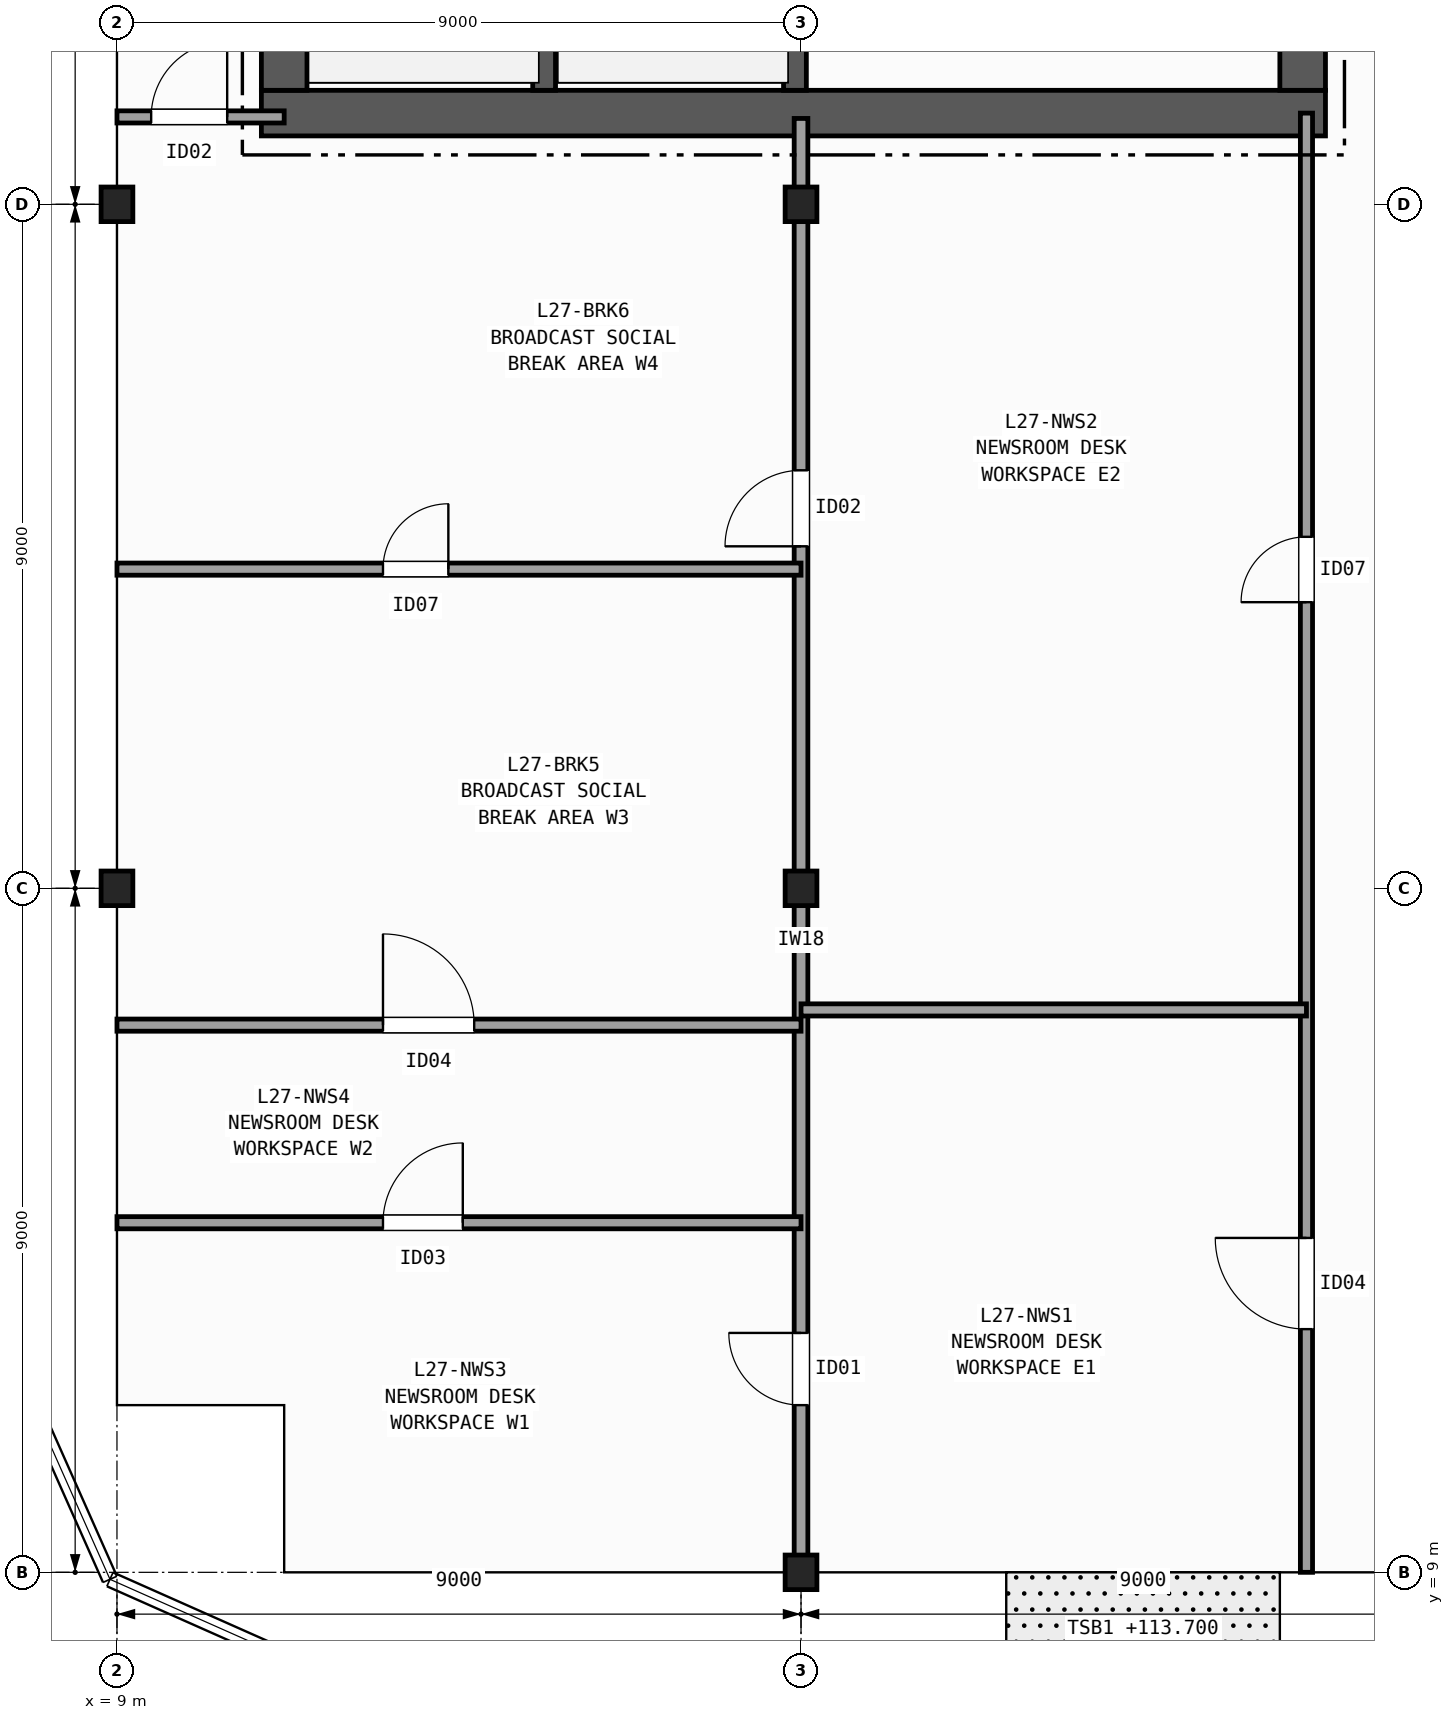
"""IFC4 building model, lengths in metres.
Left out: names, types, materials, properties, quantities, classifications, styles, units other than length and angle.
Written with IfcOpenShell. Run it as: python <this file> out.ifc"""

import sys

from ifc_helpers import new_model, si_unit, direction, frame, frame_2d, origin, origin_2d, place, context, subcontext, project, spatial, rectangle, i_section, extrude, element, fill, save


model = new_model("IFC4")
c1 = context("Model", 3, precision=1e-05, world=origin(), true_north=direction((0.0, 1.0)))
c2 = subcontext(c1, "Body", "Model", "MODEL_VIEW")
j1 = project(units=[si_unit("LENGTHUNIT", "METRE"), si_unit("PLANEANGLEUNIT", "RADIAN")], contexts=[c1])
p1 = place(None, origin())
s1 = spatial("IfcSite", under=j1, at=p1, CompositionType="ELEMENT")
p2 = place(p1, origin())
s2 = spatial("IfcBuilding", under=s1, at=p2, CompositionType="ELEMENT")
p3 = place(p2, frame((0.0, 0.0, 113.7)))
s3 = spatial("IfcBuildingStorey", under=s2, at=p3, CompositionType="ELEMENT", Elevation=113.7)
for number, where, z_axis, x_axis in (
    (1, (9.0, 18.0, 0.0), (0.0, 0.0, 1.0), (1.0, 0.0, 0.0)),
    (2, (9.0, 27.0, 0.0), (0.0, 0.0, 1.0), (1.0, 0.0, 0.0)),
    (3, (18.0, 9.0, 0.0), (0.0, 0.0, 1.0), (1.0, 0.0, 0.0)),
    (4, (18.0, 18.0, 0.0), (0.0, 0.0, 1.0), (1.0, 0.0, 0.0)),
    (5, (18.0, 27.0, 0.0), (0.0, 0.0, 1.0), (1.0, 0.0, 0.0)),
):
    element("IfcColumn", number, at=place(p3, frame(where, z_axis=z_axis, x_axis=x_axis)), inside=s3, PredefinedType="COLUMN", context=c2, shape_type="SweptSolid", body=[
        extrude(i_section(OverallWidth=0.418, OverallDepth=0.455, WebThickness=0.042, FlangeThickness=0.068, FilletRadius=0.015, at=origin_2d()), origin(), (0.0, 0.0, 1.0), 3.7),
    ])
p4 = place(p3, frame((10.9, 28.2, 0.0), z_axis=(0.0, 0.0, 1.0), x_axis=(1.0, 0.0, 0.0)))
e6 = element("IfcWall", 6, at=p4, inside=s3, PredefinedType="SHEAR", context=c2, shape_type="SweptSolid", body=[
    extrude(rectangle(XDim=14.0, YDim=0.6, at=frame_2d((7.0, 0.0))), origin(), (0.0, 0.0, 1.0), 3.42),
])
p5 = place(p3, frame((11.2, 42.1, 0.0), z_axis=(0.0, 0.0, 1.0), x_axis=(0.0, -1.0, 0.0)))
e7 = element("IfcWall", 7, at=p5, inside=s3, PredefinedType="SHEAR", context=c2, shape_type="SweptSolid", body=[
    extrude(rectangle(XDim=13.6, YDim=0.6, at=frame_2d((6.8, 0.0))), origin(), (0.0, 0.0, 1.0), 3.42),
])
p6 = place(p3, frame((24.6, 28.5, 0.0), z_axis=(0.0, 0.0, 1.0), x_axis=(0.0, 1.0, 0.0)))
e8 = element("IfcWall", 8, at=p6, inside=s3, PredefinedType="SHEAR", context=c2, shape_type="SweptSolid", body=[
    extrude(rectangle(XDim=13.6, YDim=0.6, at=frame_2d((6.8, 0.0))), origin(), (0.0, 0.0, 1.0), 3.42),
])
p7 = place(p6, frame((3.3, 0.0, 0.0)))
e9 = element("IfcOpeningElement", 9, at=p7, cuts=e8, PredefinedType="OPENING", context=c2, shape_type="SweptSolid", body=[
    extrude(rectangle(XDim=1.5, YDim=2.2, at=frame_2d((0.75, 1.1))), frame((0.0, 0.31, 0.0), z_axis=(0.0, -1.0, 0.0), x_axis=(1.0, 0.0, 0.0)), (0.0, 0.0, 1.0), 0.62),
])
p8 = place(p6, frame((9.9, 0.0, 0.0)))
e10 = element("IfcOpeningElement", 10, at=p8, cuts=e8, PredefinedType="OPENING", context=c2, shape_type="SweptSolid", body=[
    extrude(rectangle(XDim=0.9, YDim=2.1, at=frame_2d((0.45, 1.05))), frame((0.0, 0.31, 0.0), z_axis=(0.0, -1.0, 0.0), x_axis=(1.0, 0.0, 0.0)), (0.0, 0.0, 1.0), 0.62),
])
p9 = place(p6, frame((12.0, 0.0, 0.0)))
e11 = element("IfcOpeningElement", 11, at=p9, cuts=e8, PredefinedType="OPENING", context=c2, shape_type="SweptSolid", body=[
    extrude(rectangle(XDim=0.9, YDim=2.1, at=frame_2d((0.45, 1.05))), frame((0.0, 0.31, 0.0), z_axis=(0.0, -1.0, 0.0), x_axis=(1.0, 0.0, 0.0)), (0.0, 0.0, 1.0), 0.62),
])
p10 = place(p3, frame((14.62, 28.5, 0.0), z_axis=(0.0, 0.0, 1.0), x_axis=(0.0, 1.0, 0.0)))
e12 = element("IfcWall", 12, at=p10, inside=s3, PredefinedType="SHEAR", context=c2, shape_type="SweptSolid", body=[
    extrude(rectangle(XDim=8.95, YDim=0.3, at=frame_2d((4.475, 0.0))), origin(), (0.0, 0.0, 1.0), 3.42),
])
p11 = place(p3, frame((17.92, 42.1, 0.0), z_axis=(0.0, 0.0, 1.0), x_axis=(0.0, -1.0, 0.0)))
e13 = element("IfcWall", 13, at=p11, inside=s3, PredefinedType="SHEAR", context=c2, shape_type="SweptSolid", body=[
    extrude(rectangle(XDim=13.6, YDim=0.3, at=frame_2d((6.8, 0.0))), origin(), (0.0, 0.0, 1.0), 3.42),
])
p12 = place(p11, frame((1.925, 0.0, 0.0)))
e14 = element("IfcOpeningElement", 14, at=p12, cuts=e13, PredefinedType="OPENING", context=c2, shape_type="SweptSolid", body=[
    extrude(rectangle(XDim=1.15, YDim=2.15, at=frame_2d((0.575, 1.075))), frame((0.0, 0.16, 0.0), z_axis=(0.0, -1.0, 0.0), x_axis=(1.0, 0.0, 0.0)), (0.0, 0.0, 1.0), 0.32),
])
p13 = place(p3, frame((9.0, 28.15, 0.0), z_axis=(0.0, 0.0, 1.0), x_axis=(1.0, 0.0, 0.0)))
e15 = element("IfcWall", 15, at=p13, inside=s3, PredefinedType="PARTITIONING", context=c2, shape_type="SweptSolid", body=[
    extrude(rectangle(XDim=2.2, YDim=0.16, at=frame_2d((1.1, 0.0))), origin(), (0.0, 0.0, 1.0), 2.634),
])
p14 = place(p13, frame((0.45, 0.0, 0.0)))
e16 = element("IfcOpeningElement", 16, at=p14, cuts=e15, PredefinedType="OPENING", context=c2, shape_type="SweptSolid", body=[
    extrude(rectangle(XDim=1.0, YDim=2.1, at=frame_2d((0.5, 1.05))), frame((0.0, 0.09, 0.0), z_axis=(0.0, -1.0, 0.0), x_axis=(1.0, 0.0, 0.0)), (0.0, 0.0, 1.0), 0.18),
])
p15 = place(p3, frame((24.65, 9.0, 0.0), z_axis=(0.0, 0.0, 1.0), x_axis=(0.0, 1.0, 0.0)))
e17 = element("IfcWall", 17, at=p15, inside=s3, PredefinedType="PARTITIONING", context=c2, shape_type="SweptSolid", body=[
    extrude(rectangle(XDim=19.2, YDim=0.16, at=frame_2d((9.6, 0.0))), origin(), (0.0, 0.0, 1.0), 2.634),
])
p16 = place(p15, frame((3.2, 0.0, 0.0)))
e18 = element("IfcOpeningElement", 18, at=p16, cuts=e17, PredefinedType="OPENING", context=c2, shape_type="SweptSolid", body=[
    extrude(rectangle(XDim=1.2, YDim=2.15, at=frame_2d((0.6, 1.075))), frame((0.0, 0.09, 0.0), z_axis=(0.0, -1.0, 0.0), x_axis=(1.0, 0.0, 0.0)), (0.0, 0.0, 1.0), 0.18),
])
p17 = place(p15, frame((12.765, 0.0, 0.0)))
e19 = element("IfcOpeningElement", 19, at=p17, cuts=e17, PredefinedType="OPENING", context=c2, shape_type="SweptSolid", body=[
    extrude(rectangle(XDim=0.86, YDim=2.05, at=frame_2d((0.43, 1.025))), frame((0.0, 0.09, 0.0), z_axis=(0.0, -1.0, 0.0), x_axis=(1.0, 0.0, 0.0)), (0.0, 0.0, 1.0), 0.18),
])
p18 = place(p3, frame((18.0, 9.0, 0.0), z_axis=(0.0, 0.0, 1.0), x_axis=(0.0, 1.0, 0.0)))
e20 = element("IfcWall", 20, at=p18, inside=s3, PredefinedType="PARTITIONING", context=c2, shape_type="SweptSolid", body=[
    extrude(rectangle(XDim=19.13, YDim=0.18, at=frame_2d((9.565, 0.0))), origin(), (0.0, 0.0, 1.0), 2.634),
])
p19 = place(p18, frame((2.2, 0.0, 0.0)))
e21 = element("IfcOpeningElement", 21, at=p19, cuts=e20, PredefinedType="OPENING", context=c2, shape_type="SweptSolid", body=[
    extrude(rectangle(XDim=0.95, YDim=2.1, at=frame_2d((0.475, 1.05))), frame((0.0, 0.1, 0.0), z_axis=(0.0, -1.0, 0.0), x_axis=(1.0, 0.0, 0.0)), (0.0, 0.0, 1.0), 0.2),
])
p20 = place(p18, frame((13.5, 0.0, 0.0)))
e22 = element("IfcOpeningElement", 22, at=p20, cuts=e20, PredefinedType="OPENING", context=c2, shape_type="SweptSolid", body=[
    extrude(rectangle(XDim=1.0, YDim=2.1, at=frame_2d((0.5, 1.05))), frame((0.0, 0.1, 0.0), z_axis=(0.0, -1.0, 0.0), x_axis=(1.0, 0.0, 0.0)), (0.0, 0.0, 1.0), 0.2),
])
p21 = place(p3, frame((18.0, 16.4, 0.0), z_axis=(0.0, 0.0, 1.0), x_axis=(1.0, 0.0, 0.0)))
e23 = element("IfcWall", 23, at=p21, inside=s3, PredefinedType="PARTITIONING", context=c2, shape_type="SweptSolid", body=[
    extrude(rectangle(XDim=6.65, YDim=0.16, at=frame_2d((3.325, 0.0))), origin(), (0.0, 0.0, 1.0), 2.789),
])
p22 = place(p3, frame((9.0, 13.6, 0.0), z_axis=(0.0, 0.0, 1.0), x_axis=(1.0, 0.0, 0.0)))
e24 = element("IfcWall", 24, at=p22, inside=s3, PredefinedType="PARTITIONING", context=c2, shape_type="SweptSolid", body=[
    extrude(rectangle(XDim=9.0, YDim=0.16, at=frame_2d((4.5, 0.0))), origin(), (0.0, 0.0, 1.0), 2.792),
])
p23 = place(p22, frame((3.5, 0.0, 0.0)))
e25 = element("IfcOpeningElement", 25, at=p23, cuts=e24, PredefinedType="OPENING", context=c2, shape_type="SweptSolid", body=[
    extrude(rectangle(XDim=1.05, YDim=2.15, at=frame_2d((0.525, 1.075))), frame((0.0, 0.09, 0.0), z_axis=(0.0, -1.0, 0.0), x_axis=(1.0, 0.0, 0.0)), (0.0, 0.0, 1.0), 0.18),
])
p24 = place(p3, frame((9.0, 16.2, 0.0), z_axis=(0.0, 0.0, 1.0), x_axis=(1.0, 0.0, 0.0)))
e26 = element("IfcWall", 26, at=p24, inside=s3, PredefinedType="PARTITIONING", context=c2, shape_type="SweptSolid", body=[
    extrude(rectangle(XDim=9.0, YDim=0.16, at=frame_2d((4.5, 0.0))), origin(), (0.0, 0.0, 1.0), 2.792),
])
p25 = place(p24, frame((3.5, 0.0, 0.0)))
e27 = element("IfcOpeningElement", 27, at=p25, cuts=e26, PredefinedType="OPENING", context=c2, shape_type="SweptSolid", body=[
    extrude(rectangle(XDim=1.2, YDim=2.15, at=frame_2d((0.6, 1.075))), frame((0.0, 0.09, 0.0), z_axis=(0.0, -1.0, 0.0), x_axis=(1.0, 0.0, 0.0)), (0.0, 0.0, 1.0), 0.18),
])
p26 = place(p3, frame((9.0, 22.2, 0.0), z_axis=(0.0, 0.0, 1.0), x_axis=(1.0, 0.0, 0.0)))
e28 = element("IfcWall", 28, at=p26, inside=s3, PredefinedType="PARTITIONING", context=c2, shape_type="SweptSolid", body=[
    extrude(rectangle(XDim=9.0, YDim=0.16, at=frame_2d((4.5, 0.0))), origin(), (0.0, 0.0, 1.0), 2.634),
])
p27 = place(p26, frame((3.5, 0.0, 0.0)))
e29 = element("IfcOpeningElement", 29, at=p27, cuts=e28, PredefinedType="OPENING", context=c2, shape_type="SweptSolid", body=[
    extrude(rectangle(XDim=0.86, YDim=2.05, at=frame_2d((0.43, 1.025))), frame((0.0, 0.09, 0.0), z_axis=(0.0, -1.0, 0.0), x_axis=(1.0, 0.0, 0.0)), (0.0, 0.0, 1.0), 0.18),
])
p28 = place(p14, origin())
e30 = element("IfcDoor", 30, at=p28, inside=s3, OperationType="SINGLE_SWING_RIGHT", PredefinedType="DOOR", context=c2, shape_type="SweptSolid", body=[
    extrude(rectangle(XDim=1.0, YDim=2.1, at=frame_2d((0.5, 1.05))), frame((0.0, 0.025, 0.0), z_axis=(0.0, -1.0, 0.0), x_axis=(1.0, 0.0, 0.0)), (0.0, 0.0, 1.0), 0.05),
])
fill(e16, e30)
p29 = place(p16, origin())
e31 = element("IfcDoor", 31, at=p29, inside=s3, OperationType="SINGLE_SWING_RIGHT", PredefinedType="DOOR", context=c2, shape_type="SweptSolid", body=[
    extrude(rectangle(XDim=1.2, YDim=2.15, at=frame_2d((0.6, 1.075))), frame((0.0, 0.025, 0.0), z_axis=(0.0, -1.0, 0.0), x_axis=(1.0, 0.0, 0.0)), (0.0, 0.0, 1.0), 0.05),
])
fill(e18, e31)
p30 = place(p17, origin())
e32 = element("IfcDoor", 32, at=p30, inside=s3, OperationType="SINGLE_SWING_LEFT", PredefinedType="DOOR", context=c2, shape_type="SweptSolid", body=[
    extrude(rectangle(XDim=0.86, YDim=2.05, at=frame_2d((0.43, 1.025))), frame((0.0, 0.025, 0.0), z_axis=(0.0, -1.0, 0.0), x_axis=(1.0, 0.0, 0.0)), (0.0, 0.0, 1.0), 0.05),
])
fill(e19, e32)
p31 = place(p19, origin())
e33 = element("IfcDoor", 33, at=p31, inside=s3, OperationType="SINGLE_SWING_RIGHT", PredefinedType="DOOR", context=c2, shape_type="SweptSolid", body=[
    extrude(rectangle(XDim=0.95, YDim=2.1, at=frame_2d((0.475, 1.05))), frame((0.0, 0.025, 0.0), z_axis=(0.0, -1.0, 0.0), x_axis=(1.0, 0.0, 0.0)), (0.0, 0.0, 1.0), 0.05),
])
fill(e21, e33)
p32 = place(p20, origin())
e34 = element("IfcDoor", 34, at=p32, inside=s3, OperationType="SINGLE_SWING_LEFT", PredefinedType="DOOR", context=c2, shape_type="SweptSolid", body=[
    extrude(rectangle(XDim=1.0, YDim=2.1, at=frame_2d((0.5, 1.05))), frame((0.0, 0.025, 0.0), z_axis=(0.0, -1.0, 0.0), x_axis=(1.0, 0.0, 0.0)), (0.0, 0.0, 1.0), 0.05),
])
fill(e22, e34)
p33 = place(p23, origin())
e35 = element("IfcDoor", 35, at=p33, inside=s3, OperationType="SINGLE_SWING_RIGHT", PredefinedType="DOOR", context=c2, shape_type="SweptSolid", body=[
    extrude(rectangle(XDim=1.05, YDim=2.15, at=frame_2d((0.525, 1.075))), frame((0.0, 0.025, 0.0), z_axis=(0.0, -1.0, 0.0), x_axis=(1.0, 0.0, 0.0)), (0.0, 0.0, 1.0), 0.05),
])
fill(e25, e35)
p34 = place(p25, origin())
e36 = element("IfcDoor", 36, at=p34, inside=s3, OperationType="SINGLE_SWING_LEFT", PredefinedType="DOOR", context=c2, shape_type="SweptSolid", body=[
    extrude(rectangle(XDim=1.2, YDim=2.15, at=frame_2d((0.6, 1.075))), frame((0.0, 0.025, 0.0), z_axis=(0.0, -1.0, 0.0), x_axis=(1.0, 0.0, 0.0)), (0.0, 0.0, 1.0), 0.05),
])
fill(e27, e36)
p35 = place(p27, origin())
e37 = element("IfcDoor", 37, at=p35, inside=s3, OperationType="SINGLE_SWING_RIGHT", PredefinedType="DOOR", context=c2, shape_type="SweptSolid", body=[
    extrude(rectangle(XDim=0.86, YDim=2.05, at=frame_2d((0.43, 1.025))), frame((0.0, 0.025, 0.0), z_axis=(0.0, -1.0, 0.0), x_axis=(1.0, 0.0, 0.0)), (0.0, 0.0, 1.0), 0.05),
])
fill(e29, e37)
save(model, sys.argv[1])
